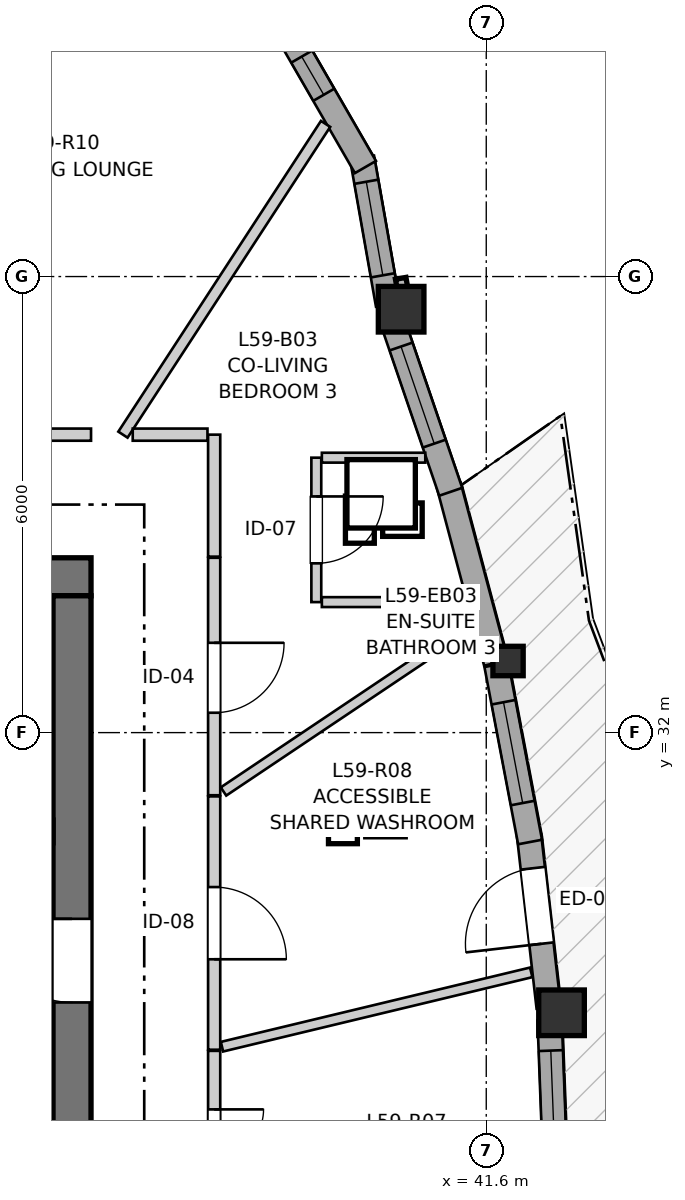
"""IFC4 building model, lengths in metres.
Left out: names, types, materials, properties, quantities, classifications, styles, units other than length and angle.
Written with IfcOpenShell. Run it as: python <this file> out.ifc"""

import sys

from ifc_helpers import new_model, si_unit, direction, frame, frame_2d, origin, origin_2d, place, context, subcontext, project, spatial, rectangle, i_section, extrude, source, transform, mapped, element, fill, save


model = new_model("IFC4")
c1 = context("Model", 3, precision=1e-05, world=origin(), true_north=direction((0.0, 1.0)))
c2 = subcontext(c1, "Body", "Model", "MODEL_VIEW")
j1 = project(units=[si_unit("LENGTHUNIT", "METRE"), si_unit("PLANEANGLEUNIT", "RADIAN")], contexts=[c1])
p1 = place(None, origin())
s1 = spatial("IfcSite", under=j1, at=p1, CompositionType="ELEMENT")
p2 = place(p1, origin())
s2 = spatial("IfcBuilding", under=s1, at=p2, CompositionType="ELEMENT")
p3 = place(p2, frame((0.0, 0.0, 198.8)))
s3 = spatial("IfcBuildingStorey", under=s2, at=p3, CompositionType="ELEMENT", Elevation=198.8)
p4 = place(p3, frame((36.4, 34.05, 0.0), z_axis=(0.0, 0.0, 1.0), x_axis=(-1.0, 0.0, 0.0)))
e1 = element("IfcWall", 1, at=p4, inside=s3, PredefinedType="SHEAR", context=c2, shape_type="SweptSolid", body=[
    extrude(rectangle(XDim=12.1, YDim=0.5, at=frame_2d((6.05, 0.0))), origin(), (0.0, 0.0, 1.0), 2.96),
])
p5 = place(p3, frame((36.15, 18.2, 0.0), z_axis=(0.0, 0.0, 1.0), x_axis=(0.0, 1.0, 0.0)))
e2 = element("IfcWall", 2, at=p5, inside=s3, PredefinedType="SHEAR", context=c2, shape_type="SweptSolid", body=[
    extrude(rectangle(XDim=15.6, YDim=0.5, at=frame_2d((7.8, 0.0))), origin(), (0.0, 0.0, 1.0), 2.96),
])
p6 = place(p5, frame((4.25, 0.0, 0.0)))
e3 = element("IfcOpeningElement", 3, at=p6, cuts=e2, PredefinedType="OPENING", context=c2, shape_type="SweptSolid", body=[
    extrude(rectangle(XDim=1.1, YDim=2.15, at=frame_2d((0.55, 1.075))), frame((0.0, 0.26, 0.0), z_axis=(0.0, -1.0, 0.0), x_axis=(1.0, 0.0, 0.0)), (0.0, 0.0, 1.0), 0.52),
])
p7 = place(p5, frame((10.25, 0.0, 0.0)))
e4 = element("IfcOpeningElement", 4, at=p7, cuts=e2, PredefinedType="OPENING", context=c2, shape_type="SweptSolid", body=[
    extrude(rectangle(XDim=1.1, YDim=2.15, at=frame_2d((0.55, 1.075))), frame((0.0, 0.26, 0.0), z_axis=(0.0, -1.0, 0.0), x_axis=(1.0, 0.0, 0.0)), (0.0, 0.0, 1.0), 0.52),
])
p8 = place(p3, frame((24.8, 30.7, 0.0), z_axis=(0.0, 0.0, 1.0), x_axis=(1.0, 0.0, 0.0)))
e5 = element("IfcWall", 5, at=p8, inside=s3, PredefinedType="SHEAR", context=c2, shape_type="SweptSolid", body=[
    extrude(rectangle(XDim=11.1, YDim=0.3, at=frame_2d((5.55, 0.0))), origin(), (0.0, 0.0, 1.0), 2.96),
])
p9 = place(p8, frame((6.22, 0.0, 0.0)))
e6 = element("IfcOpeningElement", 6, at=p9, cuts=e5, PredefinedType="OPENING", context=c2, shape_type="SweptSolid", body=[
    extrude(rectangle(XDim=0.98, YDim=2.15, at=frame_2d((0.49, 1.075))), frame((0.0, 0.16, 0.0), z_axis=(0.0, -1.0, 0.0), x_axis=(1.0, 0.0, 0.0)), (0.0, 0.0, 1.0), 0.32),
])
p10 = place(p8, frame((9.15, 0.0, 0.0)))
e7 = element("IfcOpeningElement", 7, at=p10, cuts=e5, PredefinedType="OPENING", context=c2, shape_type="SweptSolid", body=[
    extrude(rectangle(XDim=1.15, YDim=2.15, at=frame_2d((0.575, 1.075))), frame((0.0, 0.16, 0.0), z_axis=(0.0, -1.0, 0.0), x_axis=(1.0, 0.0, 0.0)), (0.0, 0.0, 1.0), 0.32),
])
m1 = source(origin(), c2, "Body", "SweptSolid", [
    extrude(rectangle(XDim=0.6, YDim=0.6, at=origin_2d()), origin(), (0.0, 0.0, 1.0), 2.96),
])
p11 = place(p3, frame((42.59, 28.314, 0.0), z_axis=(0.0, 0.0, 1.0), x_axis=(1.0, 0.0, 0.0)))
e8 = element("IfcColumn", 8, at=p11, inside=s3, PredefinedType="COLUMN", context=c2, shape_type="MappedRepresentation", body=[
    mapped(m1, transform((0.0, 0.0, 0.0), x_axis=(1.0, 0.0, 0.0), y_axis=(0.0, 1.0, 0.0), z_axis=(0.0, 0.0, 1.0), scale=1.0)),
])
m2 = source(origin(), c2, "Body", "SweptSolid", [
    extrude(i_section(OverallWidth=0.398, OverallDepth=0.387, WebThickness=0.019, FlangeThickness=0.03, FilletRadius=0.015, at=origin_2d()), origin(), (0.0, 0.0, 1.0), 2.96),
])
p12 = place(p3, frame((41.887, 32.942, 0.0), z_axis=(0.0, 0.0, 1.0), x_axis=(1.0, 0.0, 0.0)))
e9 = element("IfcColumn", 9, at=p12, inside=s3, PredefinedType="PILASTER", context=c2, shape_type="MappedRepresentation", body=[
    mapped(m2, transform((0.0, 0.0, 0.0), x_axis=(1.0, 0.0, 0.0), y_axis=(0.0, 1.0, 0.0), z_axis=(0.0, 0.0, 1.0), scale=1.0)),
])
p13 = place(p3, frame((40.48, 37.57, 0.0), z_axis=(0.0, 0.0, 1.0), x_axis=(1.0, 0.0, 0.0)))
e10 = element("IfcColumn", 10, at=p13, inside=s3, PredefinedType="COLUMN", context=c2, shape_type="MappedRepresentation", body=[
    mapped(m1, transform((0.0, 0.0, 0.0), x_axis=(1.0, 0.0, 0.0), y_axis=(0.0, 1.0, 0.0), z_axis=(0.0, 0.0, 1.0), scale=1.0)),
])
p14 = place(p3, frame((42.52, 25.956, 0.0), z_axis=(0.0, 0.0, 1.0), x_axis=(-0.038072753844, 0.999274969873, 0.0)))
e11 = element("IfcWall", 11, at=p14, inside=s3, PredefinedType="SOLIDWALL", context=c2, shape_type="SweptSolid", body=[
    extrude(rectangle(XDim=2.264, YDim=0.32, at=frame_2d((1.132, 0.0))), origin(), (0.0, 0.0, 1.0), 2.58),
])
p15 = place(p14, frame((0.412, 0.0, 0.82)))
e12 = element("IfcOpeningElement", 12, at=p15, cuts=e11, PredefinedType="OPENING", context=c2, shape_type="SweptSolid", body=[
    extrude(rectangle(XDim=1.45, YDim=1.25, at=frame_2d((0.725, 0.625))), frame((0.0, 0.17, 0.0), z_axis=(0.0, -1.0, 0.0), x_axis=(1.0, 0.0, 0.0)), (0.0, 0.0, 1.0), 0.34),
])
p16 = place(p3, frame((42.421, 28.385, 0.0), z_axis=(0.0, 0.0, 1.0), x_axis=(-0.113220012761, 0.993569941529, 0.0)))
e13 = element("IfcWall", 13, at=p16, inside=s3, PredefinedType="SOLIDWALL", context=c2, shape_type="SweptSolid", body=[
    extrude(rectangle(XDim=2.277, YDim=0.32, at=frame_2d((1.139, 0.0))), origin(), (0.0, 0.0, 1.0), 2.58),
])
p17 = place(p16, frame((0.842, 0.0, 0.0)))
e14 = element("IfcOpeningElement", 14, at=p17, cuts=e13, PredefinedType="OPENING", context=c2, shape_type="SweptSolid", body=[
    extrude(rectangle(XDim=1.0, YDim=2.1, at=frame_2d((0.5, 1.05))), frame((0.0, 0.17, 0.0), z_axis=(0.0, -1.0, 0.0), x_axis=(1.0, 0.0, 0.0)), (0.0, 0.0, 1.0), 0.34),
])
p18 = place(p3, frame((42.177, 30.561, 0.0), z_axis=(0.0, 0.0, 1.0), x_axis=(-0.186691421418, 0.982418603839, 0.0)))
e15 = element("IfcWall", 15, at=p18, inside=s3, PredefinedType="SOLIDWALL", context=c2, shape_type="SweptSolid", body=[
    extrude(rectangle(XDim=2.374, YDim=0.32, at=frame_2d((1.187, 0.0))), origin(), (0.0, 0.0, 1.0), 2.58),
])
p19 = place(p18, frame((0.522, 0.0, 0.82)))
e16 = element("IfcOpeningElement", 16, at=p19, cuts=e15, PredefinedType="OPENING", context=c2, shape_type="SweptSolid", body=[
    extrude(rectangle(XDim=1.35, YDim=1.45, at=frame_2d((0.675, 0.725))), frame((0.0, 0.17, 0.0), z_axis=(0.0, -1.0, 0.0), x_axis=(1.0, 0.0, 0.0)), (0.0, 0.0, 1.0), 0.34),
])
p20 = place(p3, frame((41.727, 32.92, 0.0), z_axis=(0.0, 0.0, 1.0), x_axis=(-0.257057896323, 0.96639600472, 0.0)))
e17 = element("IfcWall", 17, at=p20, inside=s3, PredefinedType="SOLIDWALL", context=c2, shape_type="SweptSolid", body=[
    extrude(rectangle(XDim=2.412, YDim=0.32, at=frame_2d((1.206, 0.0))), origin(), (0.0, 0.0, 1.0), 2.58),
])
p21 = place(p3, frame((41.132, 35.168, 0.0), z_axis=(0.0, 0.0, 1.0), x_axis=(-0.323654036362, 0.94617549363, 0.0)))
e18 = element("IfcWall", 18, at=p21, inside=s3, PredefinedType="SOLIDWALL", context=c2, shape_type="SweptSolid", body=[
    extrude(rectangle(XDim=2.394, YDim=0.32, at=frame_2d((1.197, 0.0))), origin(), (0.0, 0.0, 1.0), 2.58),
])
p22 = place(p21, frame((0.67, 0.0, 0.82)))
e19 = element("IfcOpeningElement", 19, at=p22, cuts=e18, PredefinedType="OPENING", context=c2, shape_type="SweptSolid", body=[
    extrude(rectangle(XDim=1.35, YDim=1.45, at=frame_2d((0.675, 0.725))), frame((0.0, 0.17, 0.0), z_axis=(0.0, -1.0, 0.0), x_axis=(1.0, 0.0, 0.0)), (0.0, 0.0, 1.0), 0.34),
])
p23 = place(p3, frame((40.307, 37.631, 0.0), z_axis=(0.0, 0.0, 1.0), x_axis=(-0.173671780312, 0.984803590937, 0.0)))
e20 = element("IfcWall", 20, at=p23, inside=s3, PredefinedType="SOLIDWALL", context=c2, shape_type="SweptSolid", body=[
    extrude(rectangle(XDim=1.962, YDim=0.32, at=frame_2d((0.981, 0.0))), origin(), (0.0, 0.0, 1.0), 2.58),
])
p24 = place(p23, frame((0.391, 0.0, 0.82)))
e21 = element("IfcOpeningElement", 21, at=p24, cuts=e20, PredefinedType="OPENING", context=c2, shape_type="SweptSolid", body=[
    extrude(rectangle(XDim=1.25, YDim=1.35, at=frame_2d((0.625, 0.675))), frame((0.0, 0.17, 0.0), z_axis=(0.0, -1.0, 0.0), x_axis=(1.0, 0.0, 0.0)), (0.0, 0.0, 1.0), 0.34),
])
p25 = place(p3, frame((40.01, 39.441, 0.0), z_axis=(0.0, 0.0, 1.0), x_axis=(-0.49990781971, 0.866078617559, 0.0)))
e22 = element("IfcWall", 22, at=p25, inside=s3, PredefinedType="SOLIDWALL", context=c2, shape_type="SweptSolid", body=[
    extrude(rectangle(XDim=2.09, YDim=0.32, at=frame_2d((1.045, 0.0))), origin(), (0.0, 0.0, 1.0), 2.58),
])
p26 = place(p25, frame((1.097, 0.0, 0.82)))
e23 = element("IfcOpeningElement", 23, at=p26, cuts=e22, PredefinedType="OPENING", context=c2, shape_type="SweptSolid", body=[
    extrude(rectangle(XDim=0.58, YDim=1.35, at=frame_2d((0.29, 0.675))), frame((0.0, 0.17, 0.0), z_axis=(0.0, -1.0, 0.0), x_axis=(1.0, 0.0, 0.0)), (0.0, 0.0, 1.0), 0.34),
])
p27 = place(p3, frame((32.487, 35.92, 0.0), z_axis=(0.0, 0.0, 1.0), x_axis=(1.0, 0.0, 0.0)))
e24 = element("IfcWall", 24, at=p27, inside=s3, PredefinedType="PARTITIONING", context=c2, shape_type="SweptSolid", body=[
    extrude(rectangle(XDim=3.913, YDim=0.16, at=frame_2d((1.957, 0.0))), origin(), (0.0, 0.0, 1.0), 2.628),
])
p28 = place(p27, frame((1.291, 0.0, 0.0)))
e25 = element("IfcOpeningElement", 25, at=p28, cuts=e24, PredefinedType="OPENING", context=c2, shape_type="SweptSolid", body=[
    extrude(rectangle(XDim=1.3, YDim=2.1, at=frame_2d((0.65, 1.05))), frame((0.0, 0.09, 0.0), z_axis=(0.0, -1.0, 0.0), x_axis=(1.0, 0.0, 0.0)), (0.0, 0.0, 1.0), 0.18),
])
p29 = place(p3, frame((38.02, 31.161, 0.0), z_axis=(0.0, 0.0, 1.0), x_axis=(0.0, -1.0, 0.0)))
e26 = element("IfcWall", 26, at=p29, inside=s3, PredefinedType="PARTITIONING", context=c2, shape_type="SweptSolid", body=[
    extrude(rectangle(XDim=3.333, YDim=0.16, at=frame_2d((1.667, 0.0))), origin(), (0.0, 0.0, 1.0), 2.628),
])
p30 = place(p29, frame((1.193, 0.0, 0.0)))
e27 = element("IfcOpeningElement", 27, at=p30, cuts=e26, PredefinedType="OPENING", context=c2, shape_type="SweptSolid", body=[
    extrude(rectangle(XDim=0.95, YDim=2.1, at=frame_2d((0.475, 1.05))), frame((0.0, 0.09, 0.0), z_axis=(0.0, -1.0, 0.0), x_axis=(1.0, 0.0, 0.0)), (0.0, 0.0, 1.0), 0.18),
])
p31 = place(p3, frame((38.02, 34.3, 0.0), z_axis=(0.0, 0.0, 1.0), x_axis=(0.0, -1.0, 0.0)))
e28 = element("IfcWall", 28, at=p31, inside=s3, PredefinedType="PARTITIONING", context=c2, shape_type="SweptSolid", body=[
    extrude(rectangle(XDim=3.124, YDim=0.16, at=frame_2d((1.562, 0.0))), origin(), (0.0, 0.0, 1.0), 2.628),
])
p32 = place(p31, frame((1.118, 0.0, 0.0)))
e29 = element("IfcOpeningElement", 29, at=p32, cuts=e28, PredefinedType="OPENING", context=c2, shape_type="SweptSolid", body=[
    extrude(rectangle(XDim=0.92, YDim=2.1, at=frame_2d((0.46, 1.05))), frame((0.0, 0.09, 0.0), z_axis=(0.0, -1.0, 0.0), x_axis=(1.0, 0.0, 0.0)), (0.0, 0.0, 1.0), 0.18),
])
p33 = place(p3, frame((38.02, 27.813, 0.0), z_axis=(0.0, 0.0, 1.0), x_axis=(0.0, -1.0, 0.0)))
e30 = element("IfcWall", 30, at=p33, inside=s3, PredefinedType="PARTITIONING", context=c2, shape_type="SweptSolid", body=[
    extrude(rectangle(XDim=2.839, YDim=0.16, at=frame_2d((1.419, 0.0))), origin(), (0.0, 0.0, 1.0), 2.96),
])
p34 = place(p33, frame((0.77, 0.0, 0.0)))
e31 = element("IfcOpeningElement", 31, at=p34, cuts=e30, PredefinedType="OPENING", context=c2, shape_type="SweptSolid", body=[
    extrude(rectangle(XDim=1.3, YDim=2.1, at=frame_2d((0.65, 1.05))), frame((0.0, 0.09, 0.0), z_axis=(0.0, -1.0, 0.0), x_axis=(1.0, 0.0, 0.0)), (0.0, 0.0, 1.0), 0.18),
])
p35 = place(p3, frame((39.364, 35.617, 0.0), z_axis=(0.0, 0.0, 1.0), x_axis=(0.0, -1.0, 0.0)))
e32 = element("IfcWall", 32, at=p35, inside=s3, PredefinedType="PARTITIONING", context=c2, shape_type="SweptSolid", body=[
    extrude(rectangle(XDim=1.9, YDim=0.13, at=frame_2d((0.95, 0.0))), origin(), (0.0, 0.0, 1.0), 2.598),
])
p36 = place(p35, frame((0.51, 0.0, 0.0)))
e33 = element("IfcOpeningElement", 33, at=p36, cuts=e32, PredefinedType="OPENING", context=c2, shape_type="SweptSolid", body=[
    extrude(rectangle(XDim=0.88, YDim=2.05, at=frame_2d((0.44, 1.025))), frame((0.0, 0.075, 0.0), z_axis=(0.0, -1.0, 0.0), x_axis=(1.0, 0.0, 0.0)), (0.0, 0.0, 1.0), 0.15),
])
p37 = place(p3, frame((36.82, 35.92, 0.0), z_axis=(0.0, 0.0, 1.0), x_axis=(0.546222005159, 0.83764044857, 0.0)))
e34 = element("IfcWall", 34, at=p37, inside=s3, PredefinedType="PARTITIONING", context=c2, shape_type="SweptSolid", body=[
    extrude(rectangle(XDim=4.881, YDim=0.145, at=frame_2d((2.44, 0.0))), origin(), (0.0, 0.0, 1.0), 2.96),
])
p38 = place(p3, frame((38.123, 27.868, 0.0), z_axis=(0.0, 0.0, 1.0), x_axis=(0.972302502293, 0.233726002051, 0.0)))
e35 = element("IfcWall", 35, at=p38, inside=s3, PredefinedType="PARTITIONING", context=c2, shape_type="SweptSolid", body=[
    extrude(rectangle(XDim=4.185, YDim=0.13, at=frame_2d((2.092, 0.0))), origin(), (0.0, 0.0, 1.0), 2.96),
])
p39 = place(p3, frame((38.143, 31.225, 0.0), z_axis=(0.0, 0.0, 1.0), x_axis=(0.830560844451, 0.556927898084, 0.0)))
e36 = element("IfcWall", 36, at=p39, inside=s3, PredefinedType="PARTITIONING", context=c2, shape_type="SweptSolid", body=[
    extrude(rectangle(XDim=3.942, YDim=0.13, at=frame_2d((1.971, 0.0))), origin(), (0.0, 0.0, 1.0), 2.96),
])
p40 = place(p3, frame((39.437, 33.717, 0.0), z_axis=(0.0, 0.0, 1.0), x_axis=(1.0, 0.0, 0.0)))
e37 = element("IfcWall", 37, at=p40, inside=s3, PredefinedType="PARTITIONING", context=c2, shape_type="SweptSolid", body=[
    extrude(rectangle(XDim=1.727, YDim=0.13, at=frame_2d((0.864, 0.0))), origin(), (0.0, 0.0, 1.0), 2.96),
])
p41 = place(p3, frame((38.02, 34.315, 0.0), z_axis=(0.0, 0.0, 1.0), x_axis=(0.0, 1.0, 0.0)))
e38 = element("IfcWall", 38, at=p41, inside=s3, PredefinedType="PARTITIONING", context=c2, shape_type="SweptSolid", body=[
    extrude(rectangle(XDim=1.605, YDim=0.16, at=frame_2d((0.802, 0.0))), origin(), (0.0, 0.0, 1.0), 2.628),
])
p42 = place(p3, frame((39.437, 35.617, 0.0), z_axis=(0.0, 0.0, 1.0), x_axis=(1.0, 0.0, 0.0)))
e39 = element("IfcWall", 39, at=p42, inside=s3, PredefinedType="PARTITIONING", context=c2, shape_type="SweptSolid", body=[
    extrude(rectangle(XDim=1.361, YDim=0.13, at=frame_2d((0.68, 0.0))), origin(), (0.0, 0.0, 1.0), 2.96),
])
p43 = place(p3, frame((36.949, 35.92, 0.0), z_axis=(0.0, 0.0, 1.0), x_axis=(1.0, 0.0, 0.0)))
e40 = element("IfcWall", 40, at=p43, inside=s3, PredefinedType="PARTITIONING", context=c2, shape_type="SweptSolid", body=[
    extrude(rectangle(XDim=0.983, YDim=0.16, at=frame_2d((0.492, 0.0))), origin(), (0.0, 0.0, 1.0), 2.96),
])
m3 = source(origin(), c2, "Body", "SweptSolid", [
    extrude(rectangle(XDim=1.45, YDim=1.25, at=frame_2d((0.725, 0.625))), frame((0.0, 0.03, 0.0), z_axis=(0.0, -1.0, 0.0), x_axis=(1.0, 0.0, 0.0)), (0.0, 0.0, 1.0), 0.06),
])
p44 = place(p15, origin())
e41 = element("IfcWindow", 41, at=p44, inside=s3, PartitioningType="SINGLE_PANEL", PredefinedType="WINDOW", context=c2, shape_type="MappedRepresentation", body=[
    mapped(m3, transform((0.0, 0.0, 0.0), x_axis=(1.0, 0.0, 0.0), y_axis=(0.0, 1.0, 0.0), z_axis=(0.0, 0.0, 1.0), scale=1.0)),
])
fill(e12, e41)
m4 = source(origin(), c2, "Body", "SweptSolid", [
    extrude(rectangle(XDim=1.0, YDim=2.1, at=frame_2d((0.5, 1.05))), frame((0.0, 0.025, 0.0), z_axis=(0.0, -1.0, 0.0), x_axis=(1.0, 0.0, 0.0)), (0.0, 0.0, 1.0), 0.05),
])
p45 = place(p17, origin())
e42 = element("IfcDoor", 42, at=p45, inside=s3, OperationType="SINGLE_SWING_LEFT", PredefinedType="DOOR", context=c2, shape_type="MappedRepresentation", body=[
    mapped(m4, transform((0.0, 0.0, 0.0), x_axis=(1.0, 0.0, 0.0), y_axis=(0.0, 1.0, 0.0), z_axis=(0.0, 0.0, 1.0), scale=1.0)),
])
fill(e14, e42)
m5 = source(origin(), c2, "Body", "SweptSolid", [
    extrude(rectangle(XDim=1.35, YDim=1.45, at=frame_2d((0.675, 0.725))), frame((0.0, 0.03, 0.0), z_axis=(0.0, -1.0, 0.0), x_axis=(1.0, 0.0, 0.0)), (0.0, 0.0, 1.0), 0.06),
])
p46 = place(p19, origin())
e43 = element("IfcWindow", 43, at=p46, inside=s3, PartitioningType="SINGLE_PANEL", PredefinedType="WINDOW", context=c2, shape_type="MappedRepresentation", body=[
    mapped(m5, transform((0.0, 0.0, 0.0), x_axis=(1.0, 0.0, 0.0), y_axis=(0.0, 1.0, 0.0), z_axis=(0.0, 0.0, 1.0), scale=1.0)),
])
fill(e16, e43)
p47 = place(p22, origin())
e44 = element("IfcWindow", 44, at=p47, inside=s3, PartitioningType="SINGLE_PANEL", PredefinedType="WINDOW", context=c2, shape_type="MappedRepresentation", body=[
    mapped(m5, transform((0.0, 0.0, 0.0), x_axis=(1.0, 0.0, 0.0), y_axis=(0.0, 1.0, 0.0), z_axis=(0.0, 0.0, 1.0), scale=1.0)),
])
fill(e19, e44)
m6 = source(origin(), c2, "Body", "SweptSolid", [
    extrude(rectangle(XDim=1.25, YDim=1.35, at=frame_2d((0.625, 0.675))), frame((0.0, 0.03, 0.0), z_axis=(0.0, -1.0, 0.0), x_axis=(1.0, 0.0, 0.0)), (0.0, 0.0, 1.0), 0.06),
])
p48 = place(p24, origin())
e45 = element("IfcWindow", 45, at=p48, inside=s3, PartitioningType="SINGLE_PANEL", PredefinedType="WINDOW", context=c2, shape_type="MappedRepresentation", body=[
    mapped(m6, transform((0.0, 0.0, 0.0), x_axis=(1.0, 0.0, 0.0), y_axis=(0.0, 1.0, 0.0), z_axis=(0.0, 0.0, 1.0), scale=1.0)),
])
fill(e21, e45)
m7 = source(origin(), c2, "Body", "SweptSolid", [
    extrude(rectangle(XDim=0.58, YDim=1.35, at=frame_2d((0.29, 0.675))), frame((0.0, 0.03, 0.0), z_axis=(0.0, -1.0, 0.0), x_axis=(1.0, 0.0, 0.0)), (0.0, 0.0, 1.0), 0.06),
])
p49 = place(p26, origin())
e46 = element("IfcWindow", 46, at=p49, inside=s3, PartitioningType="SINGLE_PANEL", PredefinedType="WINDOW", context=c2, shape_type="MappedRepresentation", body=[
    mapped(m7, transform((0.0, 0.0, 0.0), x_axis=(1.0, 0.0, 0.0), y_axis=(0.0, 1.0, 0.0), z_axis=(0.0, 0.0, 1.0), scale=1.0)),
])
fill(e23, e46)
m8 = source(origin(), c2, "Body", "SweptSolid", [
    extrude(rectangle(XDim=1.1, YDim=2.15, at=frame_2d((0.55, 1.075))), frame((0.0, 0.025, 0.0), z_axis=(0.0, -1.0, 0.0), x_axis=(1.0, 0.0, 0.0)), (0.0, 0.0, 1.0), 0.05),
])
p50 = place(p7, origin())
e47 = element("IfcDoor", 47, at=p50, inside=s3, OperationType="SINGLE_SWING_RIGHT", PredefinedType="DOOR", context=c2, shape_type="MappedRepresentation", body=[
    mapped(m8, transform((0.0, 0.0, 0.0), x_axis=(1.0, 0.0, 0.0), y_axis=(0.0, 1.0, 0.0), z_axis=(0.0, 0.0, 1.0), scale=1.0)),
])
fill(e4, e47)
m9 = source(origin(), c2, "Body", "SweptSolid", [
    extrude(rectangle(XDim=0.95, YDim=2.1, at=frame_2d((0.475, 1.05))), frame((0.0, 0.025, 0.0), z_axis=(0.0, -1.0, 0.0), x_axis=(1.0, 0.0, 0.0)), (0.0, 0.0, 1.0), 0.05),
])
p51 = place(p30, origin())
e48 = element("IfcDoor", 48, at=p51, inside=s3, OperationType="SINGLE_SWING_RIGHT", PredefinedType="DOOR", context=c2, shape_type="MappedRepresentation", body=[
    mapped(m9, transform((0.0, 0.0, 0.0), x_axis=(1.0, 0.0, 0.0), y_axis=(0.0, 1.0, 0.0), z_axis=(0.0, 0.0, 1.0), scale=1.0)),
])
fill(e27, e48)
m10 = source(origin(), c2, "Body", "SweptSolid", [
    extrude(rectangle(XDim=0.92, YDim=2.1, at=frame_2d((0.46, 1.05))), frame((0.0, 0.025, 0.0), z_axis=(0.0, -1.0, 0.0), x_axis=(1.0, 0.0, 0.0)), (0.0, 0.0, 1.0), 0.05),
])
p52 = place(p32, origin())
e49 = element("IfcDoor", 49, at=p52, inside=s3, OperationType="SINGLE_SWING_LEFT", PredefinedType="DOOR", context=c2, shape_type="MappedRepresentation", body=[
    mapped(m10, transform((0.0, 0.0, 0.0), x_axis=(1.0, 0.0, 0.0), y_axis=(0.0, 1.0, 0.0), z_axis=(0.0, 0.0, 1.0), scale=1.0)),
])
fill(e29, e49)
m11 = source(origin(), c2, "Body", "SweptSolid", [
    extrude(rectangle(XDim=1.3, YDim=2.1, at=frame_2d((0.65, 1.05))), frame((0.0, 0.025, 0.0), z_axis=(0.0, -1.0, 0.0), x_axis=(1.0, 0.0, 0.0)), (0.0, 0.0, 1.0), 0.05),
])
p53 = place(p34, origin())
e50 = element("IfcDoor", 50, at=p53, inside=s3, OperationType="DOUBLE_DOOR_SINGLE_SWING", PredefinedType="DOOR", context=c2, shape_type="MappedRepresentation", body=[
    mapped(m11, transform((0.0, 0.0, 0.0), x_axis=(1.0, 0.0, 0.0), y_axis=(0.0, 1.0, 0.0), z_axis=(0.0, 0.0, 1.0), scale=1.0)),
])
fill(e31, e50)
m12 = source(origin(), c2, "Body", "SweptSolid", [
    extrude(rectangle(XDim=0.88, YDim=2.05, at=frame_2d((0.44, 1.025))), frame((0.0, 0.025, 0.0), z_axis=(0.0, -1.0, 0.0), x_axis=(1.0, 0.0, 0.0)), (0.0, 0.0, 1.0), 0.05),
])
p54 = place(p36, origin())
e51 = element("IfcDoor", 51, at=p54, inside=s3, OperationType="SINGLE_SWING_LEFT", PredefinedType="DOOR", context=c2, shape_type="MappedRepresentation", body=[
    mapped(m12, transform((0.0, 0.0, 0.0), x_axis=(1.0, 0.0, 0.0), y_axis=(0.0, 1.0, 0.0), z_axis=(0.0, 0.0, 1.0), scale=1.0)),
])
fill(e33, e51)
save(model, sys.argv[1])
